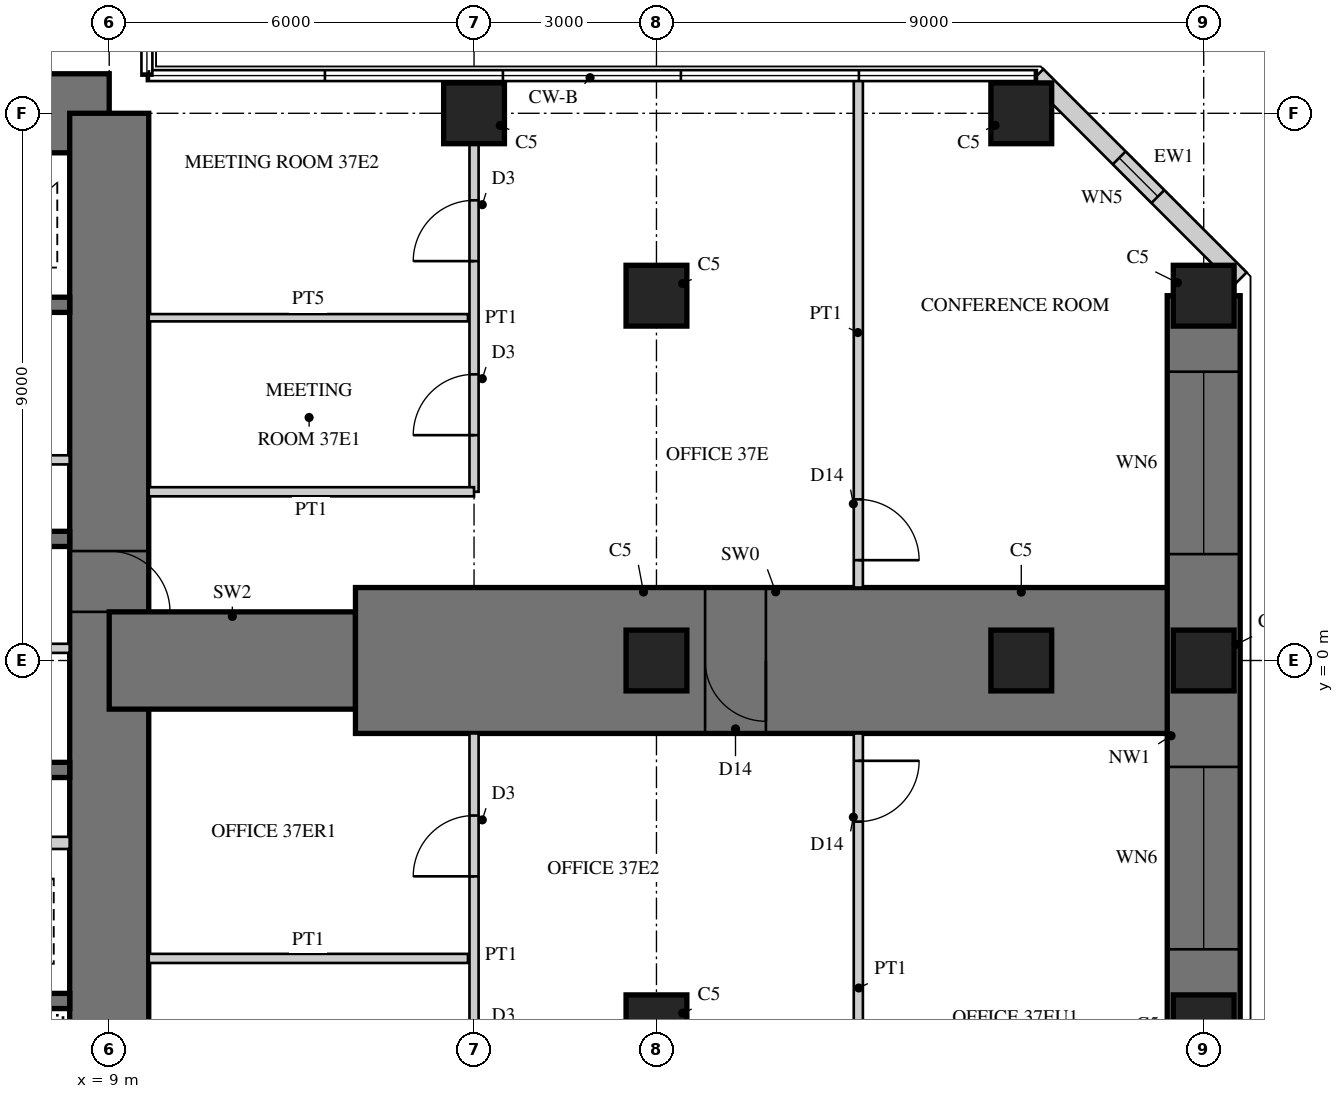
"""IFC4 building model, lengths in metres.
Left out: names, types, materials, properties, quantities, classifications, styles, units other than length and angle.
Written with IfcOpenShell. Run it as: python <this file> out.ifc"""

import sys

from ifc_helpers import new_model, si_unit, direction, frame, frame_2d, origin, origin_2d, place, context, subcontext, project, spatial, rectangle, hollow_rectangle, extrude, element, fill, save


model = new_model("IFC4")
c1 = context("Model", 3, precision=1e-05, world=origin(), true_north=direction((0.0, 1.0)))
c2 = subcontext(c1, "Body", "Model", "MODEL_VIEW")
j1 = project(units=[si_unit("LENGTHUNIT", "METRE"), si_unit("PLANEANGLEUNIT", "RADIAN")], contexts=[c1])
p1 = place(None, origin())
s1 = spatial("IfcSite", under=j1, at=p1, CompositionType="ELEMENT")
p2 = place(p1, origin())
s2 = spatial("IfcBuilding", under=s1, at=p2, CompositionType="ELEMENT")
p3 = place(p2, frame((0.0, 0.0, 152.5)))
s3 = spatial("IfcBuildingStorey", under=s2, at=p3, CompositionType="ELEMENT", Elevation=152.5)
p4 = place(p3, frame((9.0, 9.0, 0.0), z_axis=(0.0, 0.0, 1.0), x_axis=(-1.0, 0.0, 0.0)))
e1 = element("IfcWall", 1, at=p4, inside=s3, PredefinedType="SHEAR", context=c2, shape_type="SweptSolid", body=[
    extrude(rectangle(XDim=18.0, YDim=1.3, at=frame_2d((9.0, 0.0))), origin(), (0.0, 0.0, 1.0), 4.0),
])
p5 = place(p4, frame((9.8, 0.0, 0.0)))
e2 = element("IfcOpeningElement", 2, at=p5, cuts=e1, PredefinedType="OPENING", context=c2, shape_type="SweptSolid", body=[
    extrude(rectangle(XDim=1.0, YDim=2.4, at=frame_2d((0.5, 1.2))), frame((0.0, 0.66, 0.0), z_axis=(0.0, -1.0, 0.0), x_axis=(1.0, 0.0, 0.0)), (0.0, 0.0, 1.0), 1.32),
])
p6 = place(p3, frame((9.0, -9.0, 0.0), z_axis=(0.0, 0.0, 1.0), x_axis=(0.0, 1.0, 0.0)))
e3 = element("IfcWall", 3, at=p6, inside=s3, PredefinedType="SHEAR", context=c2, shape_type="SweptSolid", body=[
    extrude(rectangle(XDim=18.0, YDim=1.3, at=frame_2d((9.0, 0.0))), origin(), (0.0, 0.0, 1.0), 4.0),
])
p7 = place(p6, frame((9.8, 0.0, 0.0)))
e4 = element("IfcOpeningElement", 4, at=p7, cuts=e3, PredefinedType="OPENING", context=c2, shape_type="SweptSolid", body=[
    extrude(rectangle(XDim=1.0, YDim=2.4, at=frame_2d((0.5, 1.2))), frame((0.0, 0.66, 0.0), z_axis=(0.0, -1.0, 0.0), x_axis=(1.0, 0.0, 0.0)), (0.0, 0.0, 1.0), 1.32),
])
p8 = place(p3, frame((1.925, 2.0, 0.0), z_axis=(0.0, 0.0, 1.0), x_axis=(1.0, 0.0, 0.0)))
e5 = element("IfcWall", 5, at=p8, inside=s3, PredefinedType="SHEAR", context=c2, shape_type="SweptSolid", body=[
    extrude(rectangle(XDim=6.425, YDim=0.25, at=frame_2d((3.212, 0.0))), origin(), (0.0, 0.0, 1.0), 4.0),
])
p9 = place(p3, frame((1.925, 5.85, 0.0), z_axis=(0.0, 0.0, 1.0), x_axis=(1.0, 0.0, 0.0)))
e6 = element("IfcWall", 6, at=p9, inside=s3, PredefinedType="SHEAR", context=c2, shape_type="SweptSolid", body=[
    extrude(rectangle(XDim=6.425, YDim=0.25, at=frame_2d((3.212, 0.0))), origin(), (0.0, 0.0, 1.0), 4.0),
])
p10 = place(p9, frame((0.454, 0.0, 0.0)))
e7 = element("IfcOpeningElement", 7, at=p10, cuts=e6, PredefinedType="OPENING", context=c2, shape_type="SweptSolid", body=[
    extrude(rectangle(XDim=1.1, YDim=2.2, at=frame_2d((0.55, 1.1))), frame((0.0, 0.135, 0.0), z_axis=(0.0, -1.0, 0.0), x_axis=(1.0, 0.0, 0.0)), (0.0, 0.0, 1.0), 0.27),
])
p11 = place(p9, frame((2.663, 0.0, 0.0)))
e8 = element("IfcOpeningElement", 8, at=p11, cuts=e6, PredefinedType="OPENING", context=c2, shape_type="SweptSolid", body=[
    extrude(rectangle(XDim=1.1, YDim=2.2, at=frame_2d((0.55, 1.1))), frame((0.0, 0.135, 0.0), z_axis=(0.0, -1.0, 0.0), x_axis=(1.0, 0.0, 0.0)), (0.0, 0.0, 1.0), 0.27),
])
p12 = place(p9, frame((4.871, 0.0, 0.0)))
e9 = element("IfcOpeningElement", 9, at=p12, cuts=e6, PredefinedType="OPENING", context=c2, shape_type="SweptSolid", body=[
    extrude(rectangle(XDim=1.1, YDim=2.2, at=frame_2d((0.55, 1.1))), frame((0.0, 0.135, 0.0), z_axis=(0.0, -1.0, 0.0), x_axis=(1.0, 0.0, 0.0)), (0.0, 0.0, 1.0), 0.27),
])
p13 = place(p3, frame((1.925, 3.3, 0.0), z_axis=(0.0, 0.0, 1.0), x_axis=(1.0, 0.0, 0.0)))
e10 = element("IfcWall", 10, at=p13, inside=s3, PredefinedType="PARTITIONING", context=c2, shape_type="SweptSolid", body=[
    extrude(rectangle(XDim=6.425, YDim=0.15, at=frame_2d((3.212, 0.0))), origin(), (0.0, 0.0, 1.0), 4.0),
])
p14 = place(p13, frame((0.075, 0.0, 0.0)))
e11 = element("IfcOpeningElement", 11, at=p14, cuts=e10, PredefinedType="OPENING", context=c2, shape_type="SweptSolid", body=[
    extrude(rectangle(XDim=0.8, YDim=2.1, at=frame_2d((0.4, 1.05))), frame((0.0, 0.085, 0.0), z_axis=(0.0, -1.0, 0.0), x_axis=(1.0, 0.0, 0.0)), (0.0, 0.0, 1.0), 0.17),
])
p15 = place(p13, frame((3.675, 0.0, 0.0)))
e12 = element("IfcOpeningElement", 12, at=p15, cuts=e10, PredefinedType="OPENING", context=c2, shape_type="SweptSolid", body=[
    extrude(rectangle(XDim=0.8, YDim=2.1, at=frame_2d((0.4, 1.05))), frame((0.0, 0.085, 0.0), z_axis=(0.0, -1.0, 0.0), x_axis=(1.0, 0.0, 0.0)), (0.0, 0.0, 1.0), 0.17),
])
p16 = place(p3, frame((2.125, -1.8, 0.0), z_axis=(0.0, 0.0, 1.0), x_axis=(1.0, 0.0, 0.0)))
e13 = element("IfcWall", 13, at=p16, inside=s3, PredefinedType="SHEAR", context=c2, shape_type="SweptSolid", body=[
    extrude(rectangle(XDim=6.225, YDim=0.25, at=frame_2d((3.113, 0.0))), origin(), (0.0, 0.0, 1.0), 4.0),
])
p17 = place(p3, frame((2.125, -5.6, 0.0), z_axis=(0.0, 0.0, 1.0), x_axis=(1.0, 0.0, 0.0)))
e14 = element("IfcWall", 14, at=p17, inside=s3, PredefinedType="SHEAR", context=c2, shape_type="SweptSolid", body=[
    extrude(rectangle(XDim=6.225, YDim=0.25, at=frame_2d((3.113, 0.0))), origin(), (0.0, 0.0, 1.0), 4.0),
])
p18 = place(p17, frame((0.175, 0.0, 0.0)))
e15 = element("IfcOpeningElement", 15, at=p18, cuts=e14, PredefinedType="OPENING", context=c2, shape_type="SweptSolid", body=[
    extrude(rectangle(XDim=1.0, YDim=2.1, at=frame_2d((0.5, 1.05))), frame((0.0, 0.135, 0.0), z_axis=(0.0, -1.0, 0.0), x_axis=(1.0, 0.0, 0.0)), (0.0, 0.0, 1.0), 0.27),
])
p19 = place(p3, frame((5.725, -3.0, 0.0), z_axis=(0.0, 0.0, 1.0), x_axis=(1.0, 0.0, 0.0)))
e16 = element("IfcWall", 16, at=p19, inside=s3, PredefinedType="PARTITIONING", context=c2, shape_type="SweptSolid", body=[
    extrude(rectangle(XDim=2.625, YDim=0.2, at=frame_2d((1.312, 0.0))), origin(), (0.0, 0.0, 1.0), 4.0),
])
p20 = place(p3, frame((9.0, 0.0, 0.0), z_axis=(0.0, 0.0, 1.0), x_axis=(1.0, 0.0, 0.0)))
e17 = element("IfcWall", 17, at=p20, inside=s3, PredefinedType="SHEAR", context=c2, shape_type="SweptSolid", body=[
    extrude(rectangle(XDim=4.05, YDim=1.6, at=frame_2d((2.025, 0.0))), origin(), (0.0, 0.0, 1.0), 4.0),
])
p21 = place(p3, frame((13.05, 0.0, 0.0), z_axis=(0.0, 0.0, 1.0), x_axis=(1.0, 0.0, 0.0)))
e18 = element("IfcWall", 18, at=p21, inside=s3, PredefinedType="SHEAR", context=c2, shape_type="SweptSolid", body=[
    extrude(rectangle(XDim=13.95, YDim=2.4, at=frame_2d((6.975, 0.0))), origin(), (0.0, 0.0, 1.0), 4.0),
])
p22 = place(p21, frame((5.75, 0.0, 0.0)))
e19 = element("IfcOpeningElement", 19, at=p22, cuts=e18, PredefinedType="OPENING", context=c2, shape_type="SweptSolid", body=[
    extrude(rectangle(XDim=1.0, YDim=2.2, at=frame_2d((0.5, 1.1))), frame((0.0, 1.21, 0.0), z_axis=(0.0, -1.0, 0.0), x_axis=(1.0, 0.0, 0.0)), (0.0, 0.0, 1.0), 2.42),
])
p23 = place(p3, frame((27.0, -6.0, 0.0), z_axis=(0.0, 0.0, 1.0), x_axis=(0.0, 1.0, 0.0)))
e20 = element("IfcWall", 20, at=p23, inside=s3, PredefinedType="SHEAR", context=c2, shape_type="SweptSolid", body=[
    extrude(rectangle(XDim=12.0, YDim=1.2, at=frame_2d((6.0, 0.0))), origin(), (0.0, 0.0, 1.0), 4.0),
])
p24 = place(p23, frame((1.25, 0.0, 0.6)))
e21 = element("IfcOpeningElement", 21, at=p24, cuts=e20, PredefinedType="OPENING", context=c2, shape_type="SweptSolid", body=[
    extrude(rectangle(XDim=3.0, YDim=2.4, at=frame_2d((1.5, 1.2))), frame((0.0, 0.61, 0.0), z_axis=(0.0, -1.0, 0.0), x_axis=(1.0, 0.0, 0.0)), (0.0, 0.0, 1.0), 1.22),
])
p25 = place(p23, frame((7.75, 0.0, 0.6)))
e22 = element("IfcOpeningElement", 22, at=p25, cuts=e20, PredefinedType="OPENING", context=c2, shape_type="SweptSolid", body=[
    extrude(rectangle(XDim=3.0, YDim=2.4, at=frame_2d((1.5, 1.2))), frame((0.0, 0.61, 0.0), z_axis=(0.0, -1.0, 0.0), x_axis=(1.0, 0.0, 0.0)), (0.0, 0.0, 1.0), 1.22),
])
for number, where, z_axis, x_axis in (
    (23, (15.0, 9.0, 0.0), (0.0, 0.0, 1.0), (1.0, 0.0, 0.0)),
    (24, (24.0, 9.0, 0.0), (0.0, 0.0, 1.0), (1.0, 0.0, 0.0)),
    (25, (27.0, -6.0, 0.0), (0.0, 0.0, 1.0), (1.0, 0.0, 0.0)),
    (26, (27.0, 0.0, 0.0), (0.0, 0.0, 1.0), (1.0, 0.0, 0.0)),
    (27, (27.0, 6.0, 0.0), (0.0, 0.0, 1.0), (1.0, 0.0, 0.0)),
    (28, (18.0, -6.0, 0.0), (0.0, 0.0, 1.0), (1.0, 0.0, 0.0)),
    (29, (18.0, 0.0, 0.0), (0.0, 0.0, 1.0), (1.0, 0.0, 0.0)),
    (30, (18.0, 6.0, 0.0), (0.0, 0.0, 1.0), (1.0, 0.0, 0.0)),
    (31, (24.0, 0.0, 0.0), (0.0, 0.0, 1.0), (1.0, 0.0, 0.0)),
):
    element("IfcColumn", number, at=place(p3, frame(where, z_axis=z_axis, x_axis=x_axis)), inside=s3, PredefinedType="COLUMN", context=c2, shape_type="SweptSolid", body=[
        extrude(rectangle(XDim=1.0, YDim=1.0, at=origin_2d()), origin(), (0.0, 0.0, 1.0), 4.0),
    ])
p26 = place(p3, frame((27.6, 6.277, 0.0), z_axis=(0.0, 0.0, 1.0), x_axis=(-0.707106781187, 0.707106781187, 0.0)))
e32 = element("IfcWall", 32, at=p26, inside=s3, PredefinedType="SOLIDWALL", context=c2, shape_type="SweptSolid", body=[
    extrude(rectangle(XDim=4.728, YDim=0.3, at=frame_2d((2.364, 0.0))), origin(), (0.0, 0.0, 1.0), 3.8),
])
p27 = place(p26, frame((1.914, 0.0, 0.3)))
e33 = element("IfcOpeningElement", 33, at=p27, cuts=e32, PredefinedType="OPENING", context=c2, shape_type="SweptSolid", body=[
    extrude(rectangle(XDim=0.9, YDim=2.4, at=frame_2d((0.45, 1.2))), frame((0.0, 0.16, 0.0), z_axis=(0.0, -1.0, 0.0), x_axis=(1.0, 0.0, 0.0)), (0.0, 0.0, 1.0), 0.32),
])
p28 = place(p3, frame((2.325, 0.2, 0.0), z_axis=(0.0, 0.0, 1.0), x_axis=(1.0, 0.0, 0.0)))
e34 = element("IfcWall", 34, at=p28, inside=s3, PredefinedType="PARTITIONING", context=c2, shape_type="SweptSolid", body=[
    extrude(rectangle(XDim=6.025, YDim=0.15, at=frame_2d((3.013, 0.0))), origin(), (0.0, 0.0, 1.0), 3.8),
])
p29 = place(p28, frame((0.4, 0.0, 0.0)))
e35 = element("IfcOpeningElement", 35, at=p29, cuts=e34, PredefinedType="OPENING", context=c2, shape_type="SweptSolid", body=[
    extrude(rectangle(XDim=1.0, YDim=2.1, at=frame_2d((0.5, 1.05))), frame((0.0, 0.085, 0.0), z_axis=(0.0, -1.0, 0.0), x_axis=(1.0, 0.0, 0.0)), (0.0, 0.0, 1.0), 0.17),
])
p30 = place(p3, frame((15.0, 2.775, 0.0), z_axis=(0.0, 0.0, 1.0), x_axis=(0.0, 1.0, 0.0)))
e36 = element("IfcWall", 36, at=p30, inside=s3, PredefinedType="PARTITIONING", context=c2, shape_type="SweptSolid", body=[
    extrude(rectangle(XDim=5.725, YDim=0.15, at=frame_2d((2.863, 0.0))), origin(), (0.0, 0.0, 1.0), 3.0),
])
p31 = place(p30, frame((0.931, 0.0, 0.0)))
e37 = element("IfcOpeningElement", 37, at=p31, cuts=e36, PredefinedType="OPENING", context=c2, shape_type="SweptSolid", body=[
    extrude(rectangle(XDim=1.0, YDim=2.1, at=frame_2d((0.5, 1.05))), frame((0.0, 0.085, 0.0), z_axis=(0.0, -1.0, 0.0), x_axis=(1.0, 0.0, 0.0)), (0.0, 0.0, 1.0), 0.17),
])
p32 = place(p30, frame((3.794, 0.0, 0.0)))
e38 = element("IfcOpeningElement", 38, at=p32, cuts=e36, PredefinedType="OPENING", context=c2, shape_type="SweptSolid", body=[
    extrude(rectangle(XDim=1.0, YDim=2.1, at=frame_2d((0.5, 1.05))), frame((0.0, 0.085, 0.0), z_axis=(0.0, -1.0, 0.0), x_axis=(1.0, 0.0, 0.0)), (0.0, 0.0, 1.0), 0.17),
])
p33 = place(p3, frame((9.65, 2.775, 0.0), z_axis=(0.0, 0.0, 1.0), x_axis=(1.0, 0.0, 0.0)))
e39 = element("IfcWall", 39, at=p33, inside=s3, PredefinedType="PARTITIONING", context=c2, shape_type="SweptSolid", body=[
    extrude(rectangle(XDim=5.35, YDim=0.15, at=frame_2d((2.675, 0.0))), origin(), (0.0, 0.0, 1.0), 3.8),
])
p34 = place(p3, frame((9.65, 5.637, 0.0), z_axis=(0.0, 0.0, 1.0), x_axis=(1.0, 0.0, 0.0)))
e40 = element("IfcWall", 40, at=p34, inside=s3, PredefinedType="PLUMBINGWALL", context=c2, shape_type="SweptSolid", body=[
    extrude(rectangle(XDim=5.25, YDim=0.12, at=frame_2d((2.625, 0.0))), origin(), (0.0, 0.0, 1.0), 3.8),
])
p35 = place(p3, frame((15.0, -8.5, 0.0), z_axis=(0.0, 0.0, 1.0), x_axis=(0.0, 1.0, 0.0)))
e41 = element("IfcWall", 41, at=p35, inside=s3, PredefinedType="PARTITIONING", context=c2, shape_type="SweptSolid", body=[
    extrude(rectangle(XDim=7.3, YDim=0.15, at=frame_2d((3.65, 0.0))), origin(), (0.0, 0.0, 1.0), 3.0),
])
p36 = place(p35, frame((1.3, 0.0, 0.0)))
e42 = element("IfcOpeningElement", 42, at=p36, cuts=e41, PredefinedType="OPENING", context=c2, shape_type="SweptSolid", body=[
    extrude(rectangle(XDim=1.0, YDim=2.1, at=frame_2d((0.5, 1.05))), frame((0.0, 0.085, 0.0), z_axis=(0.0, -1.0, 0.0), x_axis=(1.0, 0.0, 0.0)), (0.0, 0.0, 1.0), 0.17),
])
p37 = place(p35, frame((4.95, 0.0, 0.0)))
e43 = element("IfcOpeningElement", 43, at=p37, cuts=e41, PredefinedType="OPENING", context=c2, shape_type="SweptSolid", body=[
    extrude(rectangle(XDim=1.0, YDim=2.1, at=frame_2d((0.5, 1.05))), frame((0.0, 0.085, 0.0), z_axis=(0.0, -1.0, 0.0), x_axis=(1.0, 0.0, 0.0)), (0.0, 0.0, 1.0), 0.17),
])
p38 = place(p3, frame((9.65, -4.9, 0.0), z_axis=(0.0, 0.0, 1.0), x_axis=(1.0, 0.0, 0.0)))
e44 = element("IfcWall", 44, at=p38, inside=s3, PredefinedType="PARTITIONING", context=c2, shape_type="SweptSolid", body=[
    extrude(rectangle(XDim=5.25, YDim=0.15, at=frame_2d((2.625, 0.0))), origin(), (0.0, 0.0, 1.0), 3.8),
])
p39 = place(p3, frame((21.32, 1.2, 0.0), z_axis=(0.0, 0.0, 1.0), x_axis=(0.0, 1.0, 0.0)))
e45 = element("IfcWall", 45, at=p39, inside=s3, PredefinedType="PARTITIONING", context=c2, shape_type="SweptSolid", body=[
    extrude(rectangle(XDim=8.38, YDim=0.15, at=frame_2d((4.19, 0.0))), origin(), (0.0, 0.0, 1.0), 3.8),
])
p40 = place(p39, frame((0.45, 0.0, 0.0)))
e46 = element("IfcOpeningElement", 46, at=p40, cuts=e45, PredefinedType="OPENING", context=c2, shape_type="SweptSolid", body=[
    extrude(rectangle(XDim=1.0, YDim=2.2, at=frame_2d((0.5, 1.1))), frame((0.0, 0.085, 0.0), z_axis=(0.0, -1.0, 0.0), x_axis=(1.0, 0.0, 0.0)), (0.0, 0.0, 1.0), 0.17),
])
p41 = place(p3, frame((21.32, -9.58, 0.0), z_axis=(0.0, 0.0, 1.0), x_axis=(0.0, 1.0, 0.0)))
e47 = element("IfcWall", 47, at=p41, inside=s3, PredefinedType="PARTITIONING", context=c2, shape_type="SweptSolid", body=[
    extrude(rectangle(XDim=8.38, YDim=0.15, at=frame_2d((4.19, 0.0))), origin(), (0.0, 0.0, 1.0), 3.8),
])
p42 = place(p41, frame((6.93, 0.0, 0.0)))
e48 = element("IfcOpeningElement", 48, at=p42, cuts=e47, PredefinedType="OPENING", context=c2, shape_type="SweptSolid", body=[
    extrude(rectangle(XDim=1.0, YDim=2.2, at=frame_2d((0.5, 1.1))), frame((0.0, 0.085, 0.0), z_axis=(0.0, -1.0, 0.0), x_axis=(1.0, 0.0, 0.0)), (0.0, 0.0, 1.0), 0.17),
])
p43 = place(p24, origin())
e49 = element("IfcWindow", 49, at=p43, inside=s3, PartitioningType="SINGLE_PANEL", PredefinedType="WINDOW", context=c2, shape_type="SweptSolid", body=[
    extrude(hollow_rectangle(XDim=3.0, YDim=2.4, WallThickness=0.06, at=frame_2d((1.5, 1.2))), frame((0.0, 0.03, 0.0), z_axis=(0.0, -1.0, 0.0), x_axis=(1.0, 0.0, 0.0)), (0.0, 0.0, 1.0), 0.06),
    extrude(rectangle(XDim=2.879, YDim=2.279, at=frame_2d((1.5, 1.2))), frame((0.0, 0.03, 0.0), z_axis=(0.0, -1.0, 0.0), x_axis=(1.0, 0.0, 0.0)), (0.0, 0.0, 1.0), 0.06),
])
fill(e21, e49)
p44 = place(p25, origin())
e50 = element("IfcWindow", 50, at=p44, inside=s3, PartitioningType="SINGLE_PANEL", PredefinedType="WINDOW", context=c2, shape_type="SweptSolid", body=[
    extrude(hollow_rectangle(XDim=3.0, YDim=2.4, WallThickness=0.06, at=frame_2d((1.5, 1.2))), frame((0.0, 0.03, 0.0), z_axis=(0.0, -1.0, 0.0), x_axis=(1.0, 0.0, 0.0)), (0.0, 0.0, 1.0), 0.06),
    extrude(rectangle(XDim=2.879, YDim=2.279, at=frame_2d((1.5, 1.2))), frame((0.0, 0.03, 0.0), z_axis=(0.0, -1.0, 0.0), x_axis=(1.0, 0.0, 0.0)), (0.0, 0.0, 1.0), 0.06),
])
fill(e22, e50)
p45 = place(p27, origin())
e51 = element("IfcWindow", 51, at=p45, inside=s3, PartitioningType="SINGLE_PANEL", PredefinedType="WINDOW", context=c2, shape_type="SweptSolid", body=[
    extrude(hollow_rectangle(XDim=0.9, YDim=2.4, WallThickness=0.06, at=frame_2d((0.45, 1.2))), frame((0.0, 0.03, 0.0), z_axis=(0.0, -1.0, 0.0), x_axis=(1.0, 0.0, 0.0)), (0.0, 0.0, 1.0), 0.06),
    extrude(rectangle(XDim=0.779, YDim=2.279, at=frame_2d((0.45, 1.2))), frame((0.0, 0.03, 0.0), z_axis=(0.0, -1.0, 0.0), x_axis=(1.0, 0.0, 0.0)), (0.0, 0.0, 1.0), 0.06),
])
fill(e33, e51)
p46 = place(p31, origin())
e52 = element("IfcDoor", 52, at=p46, inside=s3, OperationType="SINGLE_SWING_LEFT", PredefinedType="DOOR", context=c2, shape_type="SweptSolid", body=[
    extrude(rectangle(XDim=1.0, YDim=2.1, at=frame_2d((0.5, 1.05))), frame((0.0, 0.025, 0.0), z_axis=(0.0, -1.0, 0.0), x_axis=(1.0, 0.0, 0.0)), (0.0, 0.0, 1.0), 0.05),
])
fill(e37, e52)
p47 = place(p32, origin())
e53 = element("IfcDoor", 53, at=p47, inside=s3, OperationType="SINGLE_SWING_LEFT", PredefinedType="DOOR", context=c2, shape_type="SweptSolid", body=[
    extrude(rectangle(XDim=1.0, YDim=2.1, at=frame_2d((0.5, 1.05))), frame((0.0, 0.025, 0.0), z_axis=(0.0, -1.0, 0.0), x_axis=(1.0, 0.0, 0.0)), (0.0, 0.0, 1.0), 0.05),
])
fill(e38, e53)
p48 = place(p37, origin())
e54 = element("IfcDoor", 54, at=p48, inside=s3, OperationType="SINGLE_SWING_LEFT", PredefinedType="DOOR", context=c2, shape_type="SweptSolid", body=[
    extrude(rectangle(XDim=1.0, YDim=2.1, at=frame_2d((0.5, 1.05))), frame((0.0, 0.025, 0.0), z_axis=(0.0, -1.0, 0.0), x_axis=(1.0, 0.0, 0.0)), (0.0, 0.0, 1.0), 0.05),
])
fill(e43, e54)
p49 = place(p40, frame((1.0, 0.0, 0.0), z_axis=(0.0, 0.0, 1.0), x_axis=(-1.0, 0.0, 0.0)))
e55 = element("IfcDoor", 55, at=p49, inside=s3, OperationType="SINGLE_SWING_RIGHT", PredefinedType="DOOR", context=c2, shape_type="SweptSolid", body=[
    extrude(rectangle(XDim=1.0, YDim=2.2, at=frame_2d((0.5, 1.1))), frame((0.0, 0.025, 0.0), z_axis=(0.0, -1.0, 0.0), x_axis=(1.0, 0.0, 0.0)), (0.0, 0.0, 1.0), 0.05),
])
fill(e46, e55)
p50 = place(p42, frame((1.0, 0.0, 0.0), z_axis=(0.0, 0.0, 1.0), x_axis=(-1.0, 0.0, 0.0)))
e56 = element("IfcDoor", 56, at=p50, inside=s3, OperationType="SINGLE_SWING_LEFT", PredefinedType="DOOR", context=c2, shape_type="SweptSolid", body=[
    extrude(rectangle(XDim=1.0, YDim=2.2, at=frame_2d((0.5, 1.1))), frame((0.0, 0.025, 0.0), z_axis=(0.0, -1.0, 0.0), x_axis=(1.0, 0.0, 0.0)), (0.0, 0.0, 1.0), 0.05),
])
fill(e48, e56)
p51 = place(p22, frame((1.0, 0.0, 0.0), z_axis=(0.0, 0.0, 1.0), x_axis=(-1.0, 0.0, 0.0)))
e57 = element("IfcDoor", 57, at=p51, inside=s3, OperationType="SINGLE_SWING_LEFT", PredefinedType="DOOR", context=c2, shape_type="SweptSolid", body=[
    extrude(rectangle(XDim=1.0, YDim=2.2, at=frame_2d((0.5, 1.1))), frame((0.0, 0.025, 0.0), z_axis=(0.0, -1.0, 0.0), x_axis=(1.0, 0.0, 0.0)), (0.0, 0.0, 1.0), 0.05),
])
fill(e19, e57)
p52 = place(p7, frame((1.0, 0.0, 0.0), z_axis=(0.0, 0.0, 1.0), x_axis=(-1.0, 0.0, 0.0)))
e58 = element("IfcDoor", 58, at=p52, inside=s3, OperationType="SINGLE_SWING_RIGHT", PredefinedType="DOOR", context=c2, shape_type="SweptSolid", body=[
    extrude(rectangle(XDim=1.0, YDim=2.4, at=frame_2d((0.5, 1.2))), frame((0.0, -0.005, 0.0), z_axis=(0.0, -1.0, 0.0), x_axis=(1.0, 0.0, 0.0)), (0.0, 0.0, 1.0), 0.05),
])
fill(e4, e58)
save(model, sys.argv[1])
